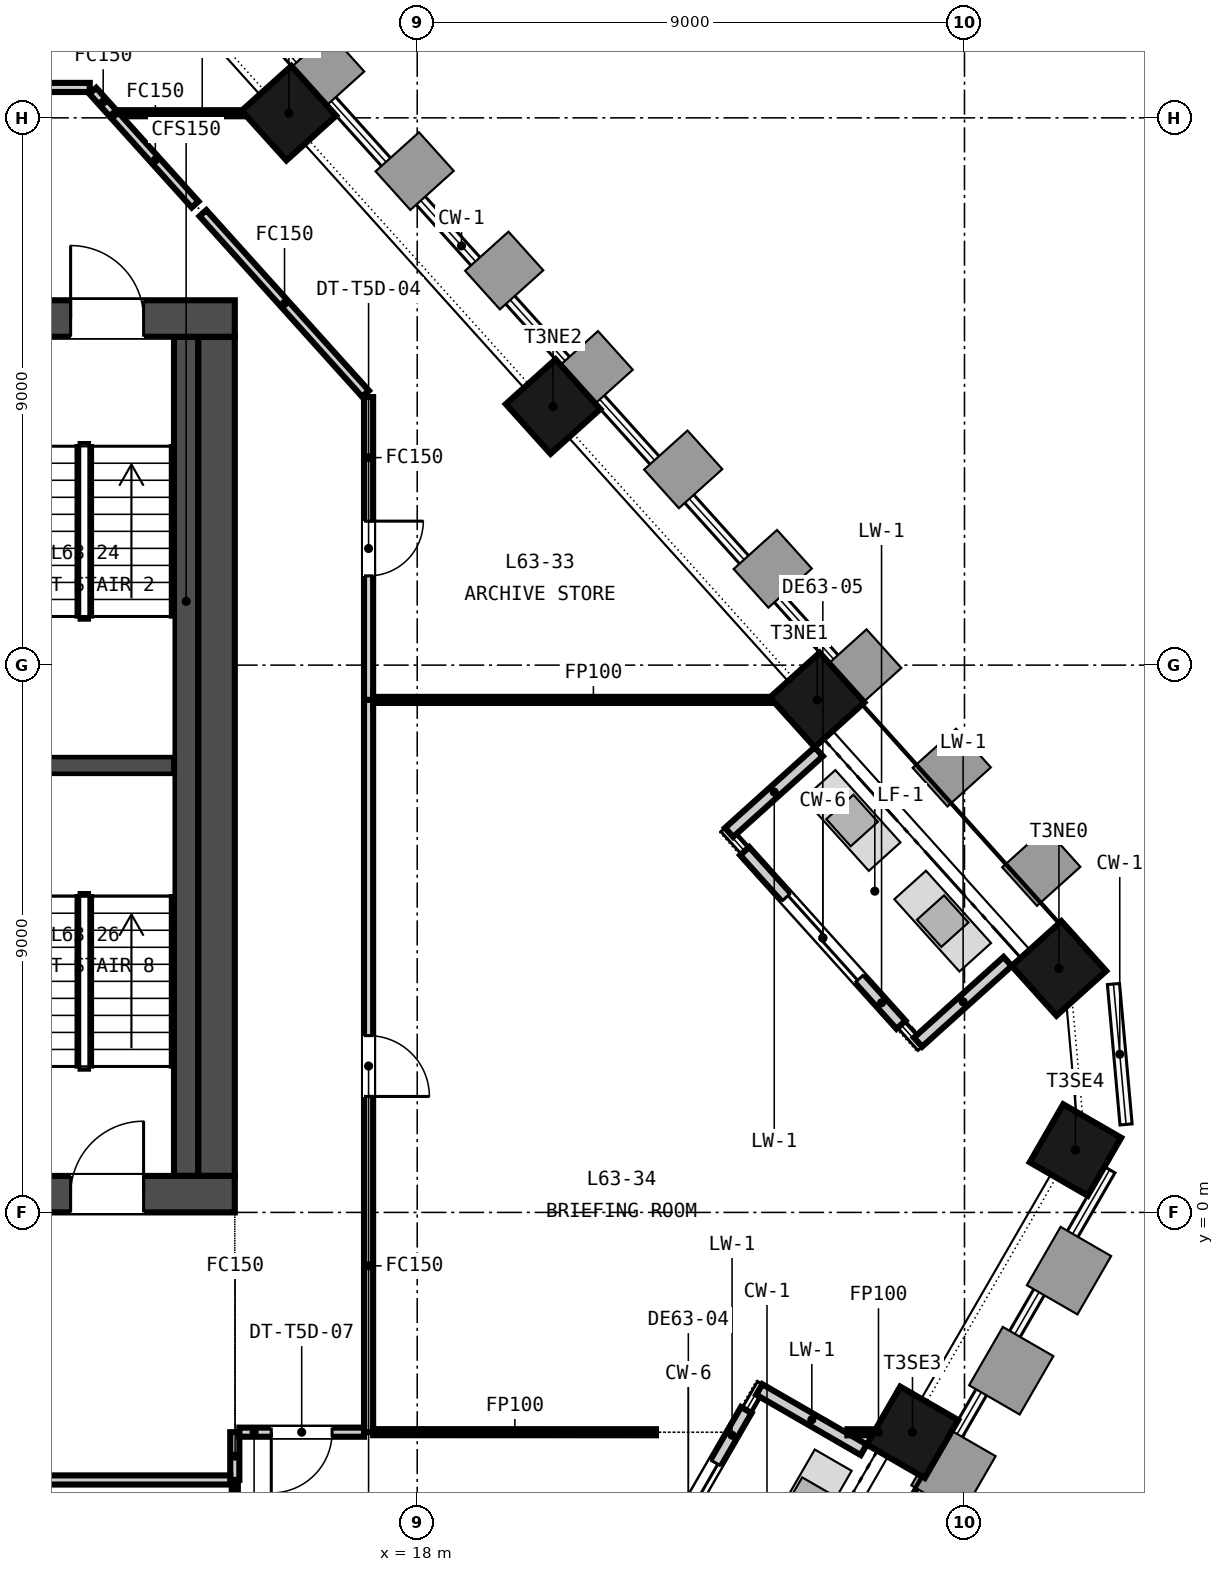
"""IFC4 building model, lengths in metres.
Left out: names, types, materials, properties, quantities, classifications, styles, units other than length and angle.
Written with IfcOpenShell. Run it as: python <this file> out.ifc"""

import sys

from ifc_helpers import new_model, si_unit, direction, frame, frame_2d, origin, origin_2d, place, context, subcontext, project, spatial, rectangle, extrude, element, fill, save


model = new_model("IFC4")
c1 = context("Model", 3, precision=1e-05, world=origin(), true_north=direction((0.0, 1.0)))
c2 = subcontext(c1, "Body", "Model", "MODEL_VIEW")
j1 = project(units=[si_unit("LENGTHUNIT", "METRE"), si_unit("PLANEANGLEUNIT", "RADIAN")], contexts=[c1])
p1 = place(None, origin())
s1 = spatial("IfcSite", under=j1, at=p1, CompositionType="ELEMENT")
p2 = place(p1, origin())
s2 = spatial("IfcBuilding", under=s1, at=p2, CompositionType="ELEMENT")
p3 = place(p2, frame((0.0, 0.0, 249.15)))
s3 = spatial("IfcBuildingStorey", under=s2, at=p3, CompositionType="ELEMENT", Elevation=249.15)
p4 = place(p3, frame((-15.0, 0.3, -0.15), z_axis=(0.0, 0.0, 1.0), x_axis=(1.0, 0.0, 0.0)))
e1 = element("IfcWall", 1, at=p4, inside=s3, PredefinedType="SOLIDWALL", context=c2, shape_type="SweptSolid", body=[
    extrude(rectangle(XDim=30.0, YDim=0.6, at=frame_2d((15.0, 0.0))), origin(), (0.0, 0.0, 1.0), 3.65),
])
p5 = place(p4, frame((5.8, 0.0, 0.15)))
e2 = element("IfcOpeningElement", 2, at=p5, cuts=e1, PredefinedType="OPENING", context=c2, shape_type="SweptSolid", body=[
    extrude(rectangle(XDim=2.4, YDim=2.4, at=frame_2d((1.2, 1.2))), frame((0.0, 0.31, 0.0), z_axis=(0.0, -1.0, 0.0), x_axis=(1.0, 0.0, 0.0)), (0.0, 0.0, 1.0), 0.62),
])
p6 = place(p4, frame((13.8, 0.0, 0.15)))
e3 = element("IfcOpeningElement", 3, at=p6, cuts=e1, PredefinedType="OPENING", context=c2, shape_type="SweptSolid", body=[
    extrude(rectangle(XDim=2.4, YDim=2.4, at=frame_2d((1.2, 1.2))), frame((0.0, 0.31, 0.0), z_axis=(0.0, -1.0, 0.0), x_axis=(1.0, 0.0, 0.0)), (0.0, 0.0, 1.0), 0.62),
])
p7 = place(p4, frame((21.8, 0.0, 0.15)))
e4 = element("IfcOpeningElement", 4, at=p7, cuts=e1, PredefinedType="OPENING", context=c2, shape_type="SweptSolid", body=[
    extrude(rectangle(XDim=2.4, YDim=2.4, at=frame_2d((1.2, 1.2))), frame((0.0, 0.31, 0.0), z_axis=(0.0, -1.0, 0.0), x_axis=(1.0, 0.0, 0.0)), (0.0, 0.0, 1.0), 0.62),
])
p8 = place(p4, frame((1.5, 0.0, 0.15)))
e5 = element("IfcOpeningElement", 5, at=p8, cuts=e1, PredefinedType="OPENING", context=c2, shape_type="SweptSolid", body=[
    extrude(rectangle(XDim=1.2, YDim=2.1, at=frame_2d((0.6, 1.05))), frame((0.0, 0.31, 0.0), z_axis=(0.0, -1.0, 0.0), x_axis=(1.0, 0.0, 0.0)), (0.0, 0.0, 1.0), 0.62),
])
p9 = place(p4, frame((27.3, 0.0, 0.15)))
e6 = element("IfcOpeningElement", 6, at=p9, cuts=e1, PredefinedType="OPENING", context=c2, shape_type="SweptSolid", body=[
    extrude(rectangle(XDim=1.2, YDim=2.1, at=frame_2d((0.6, 1.05))), frame((0.0, 0.31, 0.0), z_axis=(0.0, -1.0, 0.0), x_axis=(1.0, 0.0, 0.0)), (0.0, 0.0, 1.0), 0.62),
])
p10 = place(p3, frame((-15.0, 14.7, -0.15), z_axis=(0.0, 0.0, 1.0), x_axis=(1.0, 0.0, 0.0)))
e7 = element("IfcWall", 7, at=p10, inside=s3, PredefinedType="SOLIDWALL", context=c2, shape_type="SweptSolid", body=[
    extrude(rectangle(XDim=30.0, YDim=0.6, at=frame_2d((15.0, 0.0))), origin(), (0.0, 0.0, 1.0), 3.65),
])
p11 = place(p10, frame((9.25, 0.0, 0.15)))
e8 = element("IfcOpeningElement", 8, at=p11, cuts=e7, PredefinedType="OPENING", context=c2, shape_type="SweptSolid", body=[
    extrude(rectangle(XDim=1.5, YDim=2.1, at=frame_2d((0.75, 1.05))), frame((0.0, 0.31, 0.0), z_axis=(0.0, -1.0, 0.0), x_axis=(1.0, 0.0, 0.0)), (0.0, 0.0, 1.0), 0.62),
])
p12 = place(p10, frame((19.4, 0.0, 0.15)))
e9 = element("IfcOpeningElement", 9, at=p12, cuts=e7, PredefinedType="OPENING", context=c2, shape_type="SweptSolid", body=[
    extrude(rectangle(XDim=1.5, YDim=2.1, at=frame_2d((0.75, 1.05))), frame((0.0, 0.31, 0.0), z_axis=(0.0, -1.0, 0.0), x_axis=(1.0, 0.0, 0.0)), (0.0, 0.0, 1.0), 0.62),
])
p13 = place(p10, frame((1.5, 0.0, 0.15)))
e10 = element("IfcOpeningElement", 10, at=p13, cuts=e7, PredefinedType="OPENING", context=c2, shape_type="SweptSolid", body=[
    extrude(rectangle(XDim=1.2, YDim=2.1, at=frame_2d((0.6, 1.05))), frame((0.0, 0.31, 0.0), z_axis=(0.0, -1.0, 0.0), x_axis=(1.0, 0.0, 0.0)), (0.0, 0.0, 1.0), 0.62),
])
p14 = place(p10, frame((27.3, 0.0, 0.15)))
e11 = element("IfcOpeningElement", 11, at=p14, cuts=e7, PredefinedType="OPENING", context=c2, shape_type="SweptSolid", body=[
    extrude(rectangle(XDim=1.2, YDim=2.1, at=frame_2d((0.6, 1.05))), frame((0.0, 0.31, 0.0), z_axis=(0.0, -1.0, 0.0), x_axis=(1.0, 0.0, 0.0)), (0.0, 0.0, 1.0), 0.62),
])
p15 = place(p3, frame((14.7, 0.6, -0.15), z_axis=(0.0, 0.0, 1.0), x_axis=(0.0, 1.0, 0.0)))
e12 = element("IfcWall", 12, at=p15, inside=s3, PredefinedType="SOLIDWALL", context=c2, shape_type="SweptSolid", body=[
    extrude(rectangle(XDim=13.8, YDim=0.6, at=frame_2d((6.9, 0.0))), origin(), (0.0, 0.0, 1.0), 3.65),
])
for number, where, z_axis, x_axis in (
    (13, (26.145, -3.616, -0.15), (0.0, 0.0, 1.0), (0.5, 0.866, 0.0)),
    (14, (28.825, 1.026, -0.15), (0.0, 0.0, 1.0), (0.5, 0.866, 0.0)),
    (15, (28.553, 4.012, -0.15), (0.0, 0.0, 1.0), (-0.669, 0.743, 0.0)),
    (16, (24.577, 8.427, -0.15), (0.0, 0.0, 1.0), (-0.669, 0.743, 0.0)),
    (17, (20.233, 13.252, -0.15), (0.0, 0.0, 1.0), (-0.669, 0.743, 0.0)),
    (18, (15.89, 18.076, -0.15), (0.0, 0.0, 1.0), (-0.669, 0.743, 0.0)),
):
    element("IfcColumn", number, at=place(p3, frame(where, z_axis=z_axis, x_axis=x_axis)), inside=s3, PredefinedType="COLUMN", context=c2, shape_type="SweptSolid", body=[
        extrude(rectangle(XDim=1.1, YDim=1.1, at=origin_2d()), origin(), (0.0, 0.0, 1.0), 3.65),
    ])
p16 = place(p3, frame((21.506, -6.551, 0.0), z_axis=(0.0, 0.0, 1.0), x_axis=(0.499997905474, 0.866026613056, 0.0)))
e19 = element("IfcWall", 19, at=p16, inside=s3, PredefinedType="SOLIDWALL", context=c2, shape_type="SweptSolid", body=[
    extrude(rectangle(XDim=3.811, YDim=0.2, at=frame_2d((1.905, 0.0))), origin(), (0.0, 0.0, 1.0), 2.821),
])
p17 = place(p16, frame((1.005, 0.0, 0.0)))
e20 = element("IfcOpeningElement", 20, at=p17, cuts=e19, PredefinedType="OPENING", context=c2, shape_type="SweptSolid", body=[
    extrude(rectangle(XDim=1.8, YDim=2.4, at=frame_2d((0.9, 1.2))), frame((0.0, 0.11, 0.0), z_axis=(0.0, -1.0, 0.0), x_axis=(1.0, 0.0, 0.0)), (0.0, 0.0, 1.0), 0.22),
])
p18 = place(p3, frame((25.343, -3.904, 0.0), z_axis=(0.0, 0.0, 1.0), x_axis=(-0.866015483535, 0.500017181982, 0.0)))
e21 = element("IfcWall", 21, at=p18, inside=s3, PredefinedType="SOLIDWALL", context=c2, shape_type="SweptSolid", body=[
    extrude(rectangle(XDim=1.984, YDim=0.2, at=frame_2d((0.992, 0.0))), origin(), (0.0, 0.0, 1.0), 3.05),
])
p19 = place(p3, frame((25.956, 3.086, 0.0), z_axis=(0.0, 0.0, 1.0), x_axis=(-0.669119203651, 0.743155092363, 0.0)))
e22 = element("IfcWall", 22, at=p19, inside=s3, PredefinedType="SOLIDWALL", context=c2, shape_type="SweptSolid", body=[
    extrude(rectangle(XDim=3.842, YDim=0.2, at=frame_2d((1.921, 0.0))), origin(), (0.0, 0.0, 1.0), 3.05),
])
p20 = place(p19, frame((1.021, 0.0, 0.0)))
e23 = element("IfcOpeningElement", 23, at=p20, cuts=e22, PredefinedType="OPENING", context=c2, shape_type="SweptSolid", body=[
    extrude(rectangle(XDim=1.8, YDim=2.4, at=frame_2d((0.9, 1.2))), frame((0.0, 0.11, 0.0), z_axis=(0.0, -1.0, 0.0), x_axis=(1.0, 0.0, 0.0)), (0.0, 0.0, 1.0), 0.22),
])
p21 = place(p3, frame((27.71, 4.127, 0.0), z_axis=(0.0, 0.0, 1.0), x_axis=(-0.743171771917, -0.669100678094, 0.0)))
e24 = element("IfcWall", 24, at=p21, inside=s3, PredefinedType="SOLIDWALL", context=c2, shape_type="SweptSolid", body=[
    extrude(rectangle(XDim=1.984, YDim=0.2, at=frame_2d((0.992, 0.0))), origin(), (0.0, 0.0, 1.0), 2.751),
])
p22 = place(p3, frame((24.604, 7.576, 0.0), z_axis=(0.0, 0.0, 1.0), x_axis=(-0.743177871017, -0.669093903746, 0.0)))
e25 = element("IfcWall", 25, at=p22, inside=s3, PredefinedType="SOLIDWALL", context=c2, shape_type="SweptSolid", body=[
    extrude(rectangle(XDim=1.984, YDim=0.2, at=frame_2d((0.992, 0.0))), origin(), (0.0, 0.0, 1.0), 2.821),
])
p23 = place(p3, frame((11.05, 7.35, 0.0), z_axis=(0.0, 0.0, 1.0), x_axis=(1.0, 0.0, 0.0)))
e26 = element("IfcWall", 26, at=p23, inside=s3, PredefinedType="SOLIDWALL", context=c2, shape_type="SweptSolid", body=[
    extrude(rectangle(XDim=2.95, YDim=0.3, at=frame_2d((1.475, 0.0))), origin(), (0.0, 0.0, 1.0), 3.5),
])
p24 = place(p3, frame((14.2, 0.6, 0.0), z_axis=(0.0, 0.0, 1.0), x_axis=(0.0, 1.0, 0.0)))
e27 = element("IfcWall", 27, at=p24, inside=s3, PredefinedType="SOLIDWALL", context=c2, shape_type="SweptSolid", body=[
    extrude(rectangle(XDim=13.8, YDim=0.4, at=frame_2d((6.9, 0.0))), origin(), (0.0, 0.0, 1.0), 3.5),
])
p25 = place(p3, frame((15.0, -3.614, 0.0), z_axis=(0.0, 0.0, 1.0), x_axis=(0.0, -1.0, 0.0)))
e28 = element("IfcWall", 28, at=p25, inside=s3, PredefinedType="PARTITIONING", context=c2, shape_type="SweptSolid", body=[
    extrude(rectangle(XDim=0.786, YDim=0.15, at=frame_2d((0.393, 0.0))), origin(), (0.0, 0.0, 1.0), 2.751),
])
p26 = place(p3, frame((14.925, -4.4, 0.0), z_axis=(0.0, 0.0, 1.0), x_axis=(-1.0, 0.0, 0.0)))
e29 = element("IfcWall", 29, at=p26, inside=s3, PredefinedType="PARTITIONING", context=c2, shape_type="SweptSolid", body=[
    extrude(rectangle(XDim=9.033, YDim=0.15, at=frame_2d((4.517, 0.0))), origin(), (0.0, 0.0, 1.0), 2.751),
])
p27 = place(p26, frame((3.616, 0.0, 0.0)))
e30 = element("IfcOpeningElement", 30, at=p27, cuts=e29, PredefinedType="OPENING", context=c2, shape_type="SweptSolid", body=[
    extrude(rectangle(XDim=1.8, YDim=2.1, at=frame_2d((0.9, 1.05))), frame((0.0, 0.085, 0.0), z_axis=(0.0, -1.0, 0.0), x_axis=(1.0, 0.0, 0.0)), (0.0, 0.0, 1.0), 0.17),
])
p28 = place(p3, frame((17.2, 13.408, 0.0), z_axis=(0.0, 0.0, 1.0), x_axis=(0.0, -1.0, 0.0)))
e31 = element("IfcWall", 31, at=p28, inside=s3, PredefinedType="PARTITIONING", context=c2, shape_type="SweptSolid", body=[
    extrude(rectangle(XDim=4.98, YDim=0.15, at=frame_2d((2.49, 0.0))), origin(), (0.0, 0.0, 1.0), 2.751),
])
p29 = place(p28, frame((2.04, 0.0, 0.0)))
e32 = element("IfcOpeningElement", 32, at=p29, cuts=e31, PredefinedType="OPENING", context=c2, shape_type="SweptSolid", body=[
    extrude(rectangle(XDim=0.9, YDim=2.1, at=frame_2d((0.45, 1.05))), frame((0.0, 0.085, 0.0), z_axis=(0.0, -1.0, 0.0), x_axis=(1.0, 0.0, 0.0)), (0.0, 0.0, 1.0), 0.17),
])
p30 = place(p3, frame((17.2, 8.428, 0.0), z_axis=(0.0, 0.0, 1.0), x_axis=(0.0, -1.0, 0.0)))
e33 = element("IfcWall", 33, at=p30, inside=s3, PredefinedType="PARTITIONING", context=c2, shape_type="SweptSolid", body=[
    extrude(rectangle(XDim=12.042, YDim=0.15, at=frame_2d((6.021, 0.0))), origin(), (0.0, 0.0, 1.0), 2.751),
])
p31 = place(p30, frame((5.521, 0.0, 0.0)))
e34 = element("IfcOpeningElement", 34, at=p31, cuts=e33, PredefinedType="OPENING", context=c2, shape_type="SweptSolid", body=[
    extrude(rectangle(XDim=1.0, YDim=2.1, at=frame_2d((0.5, 1.05))), frame((0.0, 0.085, 0.0), z_axis=(0.0, -1.0, 0.0), x_axis=(1.0, 0.0, 0.0)), (0.0, 0.0, 1.0), 0.17),
])
p32 = place(p3, frame((17.125, -3.614, 0.0), z_axis=(0.0, 0.0, 1.0), x_axis=(-1.0, 0.0, 0.0)))
e35 = element("IfcWall", 35, at=p32, inside=s3, PredefinedType="PARTITIONING", context=c2, shape_type="SweptSolid", body=[
    extrude(rectangle(XDim=2.05, YDim=0.15, at=frame_2d((1.025, 0.0))), origin(), (0.0, 0.0, 1.0), 2.751),
])
p33 = place(p32, frame((0.525, 0.0, 0.0)))
e36 = element("IfcOpeningElement", 36, at=p33, cuts=e35, PredefinedType="OPENING", context=c2, shape_type="SweptSolid", body=[
    extrude(rectangle(XDim=1.0, YDim=2.1, at=frame_2d((0.5, 1.05))), frame((0.0, 0.085, 0.0), z_axis=(0.0, -1.0, 0.0), x_axis=(1.0, 0.0, 0.0)), (0.0, 0.0, 1.0), 0.17),
])
p34 = place(p3, frame((-3.98, 18.5, 0.0), z_axis=(0.0, 0.0, 1.0), x_axis=(1.0, 0.0, 0.0)))
e37 = element("IfcWall", 37, at=p34, inside=s3, PredefinedType="PARTITIONING", context=c2, shape_type="SweptSolid", body=[
    extrude(rectangle(XDim=16.595, YDim=0.15, at=frame_2d((8.297, 0.0))), origin(), (0.0, 0.0, 1.0), 2.751),
])
p35 = place(p34, frame((7.847, 0.0, 0.0)))
e38 = element("IfcOpeningElement", 38, at=p35, cuts=e37, PredefinedType="OPENING", context=c2, shape_type="SweptSolid", body=[
    extrude(rectangle(XDim=0.9, YDim=2.1, at=frame_2d((0.45, 1.05))), frame((0.0, 0.085, 0.0), z_axis=(0.0, -1.0, 0.0), x_axis=(1.0, 0.0, 0.0)), (0.0, 0.0, 1.0), 0.17),
])
p36 = place(p3, frame((12.665, 18.444, 0.0), z_axis=(0.0, 0.0, 1.0), x_axis=(0.668637752652, -0.743588297197, 0.0)))
e39 = element("IfcWall", 39, at=p36, inside=s3, PredefinedType="PARTITIONING", context=c2, shape_type="SweptSolid", body=[
    extrude(rectangle(XDim=0.495, YDim=0.15, at=frame_2d((0.248, 0.0))), origin(), (0.0, 0.0, 1.0), 2.751),
])
p37 = place(p3, frame((13.097, 18.076, 0.0), z_axis=(0.0, 0.0, 1.0), x_axis=(1.0, 0.0, 0.0)))
e40 = element("IfcWall", 40, at=p37, inside=s3, PredefinedType="PARTITIONING", context=c2, shape_type="SweptSolid", body=[
    extrude(rectangle(XDim=2.725, YDim=0.1, at=frame_2d((1.363, 0.0))), origin(), (0.0, 0.0, 1.0), 2.751),
])
p38 = place(p3, frame((13.03, 18.039, 0.0), z_axis=(0.0, 0.0, 1.0), x_axis=(0.669183955235, -0.743096786466, 0.0)))
e41 = element("IfcWall", 41, at=p38, inside=s3, PredefinedType="PARTITIONING", context=c2, shape_type="SweptSolid", body=[
    extrude(rectangle(XDim=1.969, YDim=0.15, at=frame_2d((0.984, 0.0))), origin(), (0.0, 0.0, 1.0), 2.751),
])
p39 = place(p3, frame((14.476, 16.433, 0.0), z_axis=(0.0, 0.0, 1.0), x_axis=(0.669204384193, -0.743078388985, 0.0)))
e42 = element("IfcWall", 42, at=p39, inside=s3, PredefinedType="PARTITIONING", context=c2, shape_type="SweptSolid", body=[
    extrude(rectangle(XDim=3.996, YDim=0.15, at=frame_2d((1.998, 0.0))), origin(), (0.0, 0.0, 1.0), 2.751),
])
p40 = place(p3, frame((17.275, 8.428, 0.0), z_axis=(0.0, 0.0, 1.0), x_axis=(1.0, 0.0, 0.0)))
e43 = element("IfcWall", 43, at=p40, inside=s3, PredefinedType="PARTITIONING", context=c2, shape_type="SweptSolid", body=[
    extrude(rectangle(XDim=7.235, YDim=0.1, at=frame_2d((3.618, 0.0))), origin(), (0.0, 0.0, 1.0), 2.751),
])
p41 = place(p3, frame((17.275, -3.614, 0.0), z_axis=(0.0, 0.0, 1.0), x_axis=(0.99999997796, -0.000209951706, 0.0)))
e44 = element("IfcWall", 44, at=p41, inside=s3, PredefinedType="PARTITIONING", context=c2, shape_type="SweptSolid", body=[
    extrude(rectangle(XDim=4.651, YDim=0.1, at=frame_2d((2.326, 0.0))), origin(), (0.0, 0.0, 1.0), 2.751),
])
p42 = place(p3, frame((25.074, -3.616, 0.0), z_axis=(0.0, 0.0, 1.0), x_axis=(0.99999997094, -0.000241080032, 0.0)))
e45 = element("IfcWall", 45, at=p42, inside=s3, PredefinedType="PARTITIONING", context=c2, shape_type="SweptSolid", body=[
    extrude(rectangle(XDim=1.013, YDim=0.1, at=frame_2d((0.506, 0.0))), origin(), (0.0, 0.0, 1.0), 2.751),
])
p43 = place(p3, frame((15.0, -8.685, 0.0), z_axis=(0.0, 0.0, 1.0), x_axis=(0.0, 1.0, 0.0)))
e46 = element("IfcWall", 46, at=p43, inside=s3, PredefinedType="PARTITIONING", context=c2, shape_type="SweptSolid", body=[
    extrude(rectangle(XDim=4.21, YDim=0.1, at=frame_2d((2.105, 0.0))), origin(), (0.0, 0.0, 1.0), 2.751),
])
p44 = place(p17, origin())
e47 = element("IfcDoor", 47, at=p44, inside=s3, OperationType="SINGLE_SWING_LEFT", PredefinedType="DOOR", context=c2, shape_type="SweptSolid", body=[
    extrude(rectangle(XDim=1.8, YDim=2.4, at=frame_2d((0.9, 1.2))), frame((0.0, 0.025, 0.0), z_axis=(0.0, -1.0, 0.0), x_axis=(1.0, 0.0, 0.0)), (0.0, 0.0, 1.0), 0.05),
])
fill(e20, e47)
p45 = place(p20, origin())
e48 = element("IfcDoor", 48, at=p45, inside=s3, OperationType="SINGLE_SWING_LEFT", PredefinedType="DOOR", context=c2, shape_type="SweptSolid", body=[
    extrude(rectangle(XDim=1.8, YDim=2.4, at=frame_2d((0.9, 1.2))), frame((0.0, 0.025, 0.0), z_axis=(0.0, -1.0, 0.0), x_axis=(1.0, 0.0, 0.0)), (0.0, 0.0, 1.0), 0.05),
])
fill(e23, e48)
p46 = place(p14, origin())
e49 = element("IfcDoor", 49, at=p46, inside=s3, OperationType="SINGLE_SWING_LEFT", PredefinedType="DOOR", context=c2, shape_type="SweptSolid", body=[
    extrude(rectangle(XDim=1.2, YDim=2.1, at=frame_2d((0.6, 1.05))), frame((0.0, 0.025, 0.0), z_axis=(0.0, -1.0, 0.0), x_axis=(1.0, 0.0, 0.0)), (0.0, 0.0, 1.0), 0.05),
])
fill(e11, e49)
p47 = place(p9, origin())
e50 = element("IfcDoor", 50, at=p47, inside=s3, OperationType="SINGLE_SWING_RIGHT", PredefinedType="DOOR", context=c2, shape_type="SweptSolid", body=[
    extrude(rectangle(XDim=1.2, YDim=2.1, at=frame_2d((0.6, 1.05))), frame((0.0, 0.025, 0.0), z_axis=(0.0, -1.0, 0.0), x_axis=(1.0, 0.0, 0.0)), (0.0, 0.0, 1.0), 0.05),
])
fill(e6, e50)
p48 = place(p29, origin())
e51 = element("IfcDoor", 51, at=p48, inside=s3, OperationType="SINGLE_SWING_LEFT", PredefinedType="DOOR", context=c2, shape_type="SweptSolid", body=[
    extrude(rectangle(XDim=0.9, YDim=2.1, at=frame_2d((0.45, 1.05))), frame((0.0, 0.025, 0.0), z_axis=(0.0, -1.0, 0.0), x_axis=(1.0, 0.0, 0.0)), (0.0, 0.0, 1.0), 0.05),
])
fill(e32, e51)
p49 = place(p31, origin())
e52 = element("IfcDoor", 52, at=p49, inside=s3, OperationType="SINGLE_SWING_RIGHT", PredefinedType="DOOR", context=c2, shape_type="SweptSolid", body=[
    extrude(rectangle(XDim=1.0, YDim=2.1, at=frame_2d((0.5, 1.05))), frame((0.0, 0.025, 0.0), z_axis=(0.0, -1.0, 0.0), x_axis=(1.0, 0.0, 0.0)), (0.0, 0.0, 1.0), 0.05),
])
fill(e34, e52)
p50 = place(p33, origin())
e53 = element("IfcDoor", 53, at=p50, inside=s3, OperationType="SINGLE_SWING_RIGHT", PredefinedType="DOOR", context=c2, shape_type="SweptSolid", body=[
    extrude(rectangle(XDim=1.0, YDim=2.1, at=frame_2d((0.5, 1.05))), frame((0.0, 0.025, 0.0), z_axis=(0.0, -1.0, 0.0), x_axis=(1.0, 0.0, 0.0)), (0.0, 0.0, 1.0), 0.05),
])
fill(e36, e53)
save(model, sys.argv[1])
